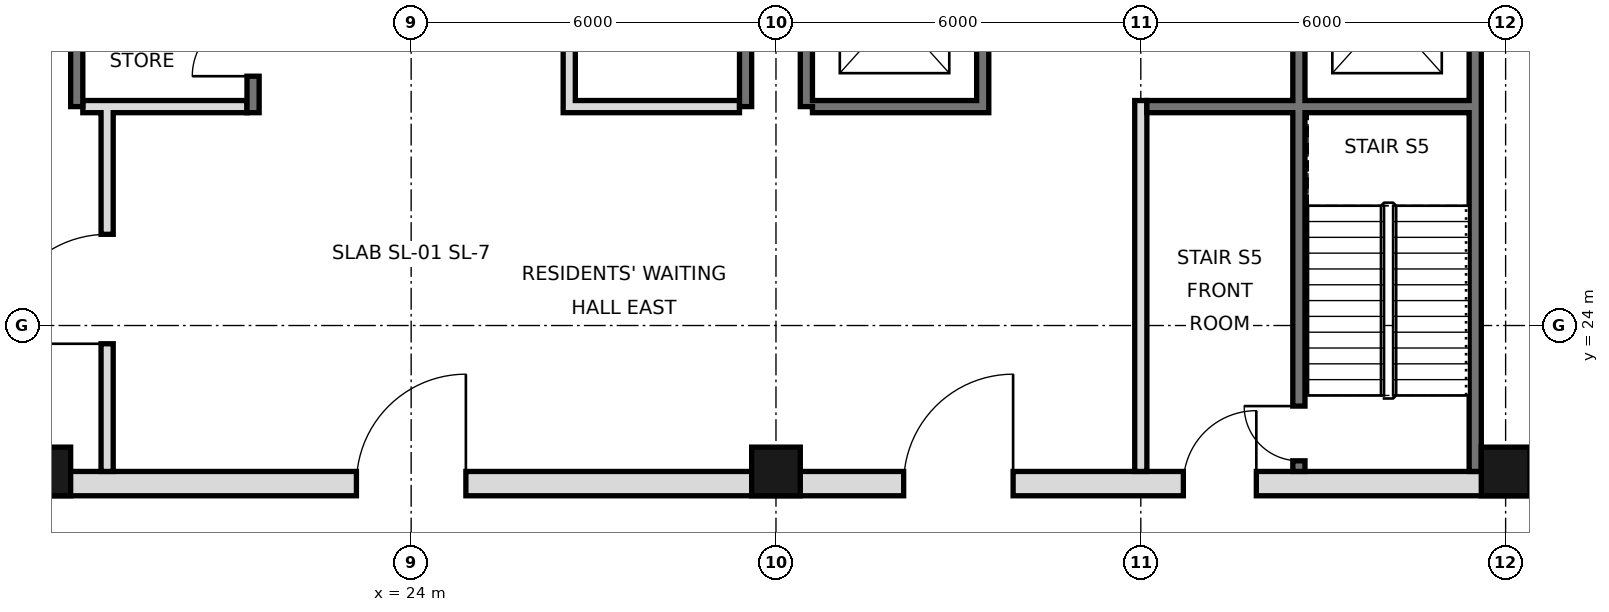
"""IFC4 building model, lengths in metres.
Left out: names, types, materials, properties, quantities, classifications, styles, units other than length and angle.
Written with IfcOpenShell. Run it as: python <this file> out.ifc"""

import sys

from ifc_helpers import new_model, si_unit, direction, frame, frame_2d, origin, origin_2d, place, context, subcontext, project, spatial, rectangle, hollow_rectangle, extrude, element, fill, save


model = new_model("IFC4")
c1 = context("Model", 3, precision=1e-05, world=origin(), true_north=direction((0.0, 1.0)))
c2 = subcontext(c1, "Body", "Model", "MODEL_VIEW")
j1 = project(units=[si_unit("LENGTHUNIT", "METRE"), si_unit("PLANEANGLEUNIT", "RADIAN")], contexts=[c1])
p1 = place(None, origin())
s1 = spatial("IfcSite", under=j1, at=p1, CompositionType="ELEMENT")
p2 = place(p1, origin())
s2 = spatial("IfcBuilding", under=s1, at=p2, CompositionType="ELEMENT")
p3 = place(p2, frame((0.0, 0.0, 277.4)))
s3 = spatial("IfcBuildingStorey", under=s2, at=p3, CompositionType="ELEMENT", Elevation=277.4)
for number, where, z_axis, x_axis in (
    (1, (18.0, 21.6, 0.0), (0.0, 0.0, 1.0), (1.0, 0.0, 0.0)),
    (2, (30.0, 21.6, 0.0), (0.0, 0.0, 1.0), (1.0, 0.0, 0.0)),
    (3, (42.0, 21.6, 0.0), (0.0, 0.0, 1.0), (1.0, 0.0, 0.0)),
):
    element("IfcColumn", number, at=place(p3, frame(where, z_axis=z_axis, x_axis=x_axis)), inside=s3, PredefinedType="COLUMN", context=c2, shape_type="SweptSolid", body=[
        extrude(hollow_rectangle(XDim=0.8, YDim=0.8, WallThickness=0.032, at=origin_2d()), origin(), (0.0, 0.0, 1.0), 4.4),
    ])
p4 = place(p3, frame((41.5, 21.6, 0.0), z_axis=(0.0, 0.0, 1.0), x_axis=(0.0, 1.0, 0.0)))
e4 = element("IfcWall", 4, at=p4, inside=s3, PredefinedType="SOLIDWALL", context=c2, shape_type="SweptSolid", body=[
    extrude(rectangle(XDim=23.5, YDim=0.2, at=frame_2d((11.75, 0.0))), origin(), (0.0, 0.0, 1.0), 4.1),
])
for number, where, z_axis, x_axis in (
    (5, (18.5, 27.6, 0.0), (0.0, 0.0, 1.0), (0.0, 1.0, 0.0)),
    (6, (29.5, 27.6, 0.0), (0.0, 0.0, 1.0), (0.0, 1.0, 0.0)),
    (7, (30.5, 27.6, 0.0), (0.0, 0.0, 1.0), (0.0, 1.0, 0.0)),
):
    element("IfcWall", number, at=place(p3, frame(where, z_axis=z_axis, x_axis=x_axis)), inside=s3, PredefinedType="SOLIDWALL", context=c2, shape_type="SweptSolid", body=[
        extrude(rectangle(XDim=17.5, YDim=0.2, at=frame_2d((8.75, 0.0))), origin(), (0.0, 0.0, 1.0), 4.1),
    ])
p5 = place(p3, frame((5.6, 21.4, 0.0), z_axis=(0.0, 0.0, 1.0), x_axis=(1.0, 0.0, 0.0)))
e8 = element("IfcWall", 8, at=p5, inside=s3, PredefinedType="SOLIDWALL", context=c2, shape_type="SweptSolid", body=[
    extrude(rectangle(XDim=36.8, YDim=0.4, at=frame_2d((18.4, 0.0))), origin(), (0.0, 0.0, 1.0), 4.1),
])
p6 = place(p5, frame((8.5, 0.0, 0.0)))
e9 = element("IfcOpeningElement", 9, at=p6, cuts=e8, PredefinedType="OPENING", context=c2, shape_type="SweptSolid", body=[
    extrude(rectangle(XDim=1.8, YDim=2.1, at=frame_2d((0.9, 1.05))), frame((0.0, 0.21, 0.0), z_axis=(0.0, -1.0, 0.0), x_axis=(1.0, 0.0, 0.0)), (0.0, 0.0, 1.0), 0.42),
])
p7 = place(p5, frame((17.5, 0.0, 0.0)))
e10 = element("IfcOpeningElement", 10, at=p7, cuts=e8, PredefinedType="OPENING", context=c2, shape_type="SweptSolid", body=[
    extrude(rectangle(XDim=1.8, YDim=2.1, at=frame_2d((0.9, 1.05))), frame((0.0, 0.21, 0.0), z_axis=(0.0, -1.0, 0.0), x_axis=(1.0, 0.0, 0.0)), (0.0, 0.0, 1.0), 0.42),
])
p8 = place(p5, frame((26.5, 0.0, 0.0)))
e11 = element("IfcOpeningElement", 11, at=p8, cuts=e8, PredefinedType="OPENING", context=c2, shape_type="SweptSolid", body=[
    extrude(rectangle(XDim=1.8, YDim=2.1, at=frame_2d((0.9, 1.05))), frame((0.0, 0.21, 0.0), z_axis=(0.0, -1.0, 0.0), x_axis=(1.0, 0.0, 0.0)), (0.0, 0.0, 1.0), 0.42),
])
p9 = place(p5, frame((4.5, 0.0, 0.0)))
e12 = element("IfcOpeningElement", 12, at=p9, cuts=e8, PredefinedType="OPENING", context=c2, shape_type="SweptSolid", body=[
    extrude(rectangle(XDim=1.2, YDim=2.1, at=frame_2d((0.6, 1.05))), frame((0.0, 0.21, 0.0), z_axis=(0.0, -1.0, 0.0), x_axis=(1.0, 0.0, 0.0)), (0.0, 0.0, 1.0), 0.42),
])
p10 = place(p5, frame((31.1, 0.0, 0.0)))
e13 = element("IfcOpeningElement", 13, at=p10, cuts=e8, PredefinedType="OPENING", context=c2, shape_type="SweptSolid", body=[
    extrude(rectangle(XDim=1.2, YDim=2.1, at=frame_2d((0.6, 1.05))), frame((0.0, 0.21, 0.0), z_axis=(0.0, -1.0, 0.0), x_axis=(1.0, 0.0, 0.0)), (0.0, 0.0, 1.0), 0.42),
])
p11 = place(p3, frame((19.0, 21.6, 0.0), z_axis=(0.0, 0.0, 1.0), x_axis=(0.0, 1.0, 0.0)))
e14 = element("IfcWall", 14, at=p11, inside=s3, PredefinedType="PARTITIONING", context=c2, shape_type="SweptSolid", body=[
    extrude(rectangle(XDim=6.0, YDim=0.2, at=frame_2d((3.0, 0.0))), origin(), (0.0, 0.0, 1.0), 4.1),
])
p12 = place(p11, frame((2.1, 0.0, 0.0)))
e15 = element("IfcOpeningElement", 15, at=p12, cuts=e14, PredefinedType="OPENING", context=c2, shape_type="SweptSolid", body=[
    extrude(rectangle(XDim=1.8, YDim=2.1, at=frame_2d((0.9, 1.05))), frame((0.0, 0.11, 0.0), z_axis=(0.0, -1.0, 0.0), x_axis=(1.0, 0.0, 0.0)), (0.0, 0.0, 1.0), 0.22),
])
p13 = place(p3, frame((21.4, 27.5, 0.0), z_axis=(0.0, 0.0, 1.0), x_axis=(0.0, 1.0, 0.0)))
e16 = element("IfcWall", 16, at=p13, inside=s3, PredefinedType="SOLIDWALL", context=c2, shape_type="SweptSolid", body=[
    extrude(rectangle(XDim=17.5, YDim=0.2, at=frame_2d((8.75, 0.0))), origin(), (0.0, 0.0, 1.0), 4.1),
])
p14 = place(p13, frame((0.6, 0.0, 0.0)))
e17 = element("IfcOpeningElement", 17, at=p14, cuts=e16, PredefinedType="OPENING", context=c2, shape_type="SweptSolid", body=[
    extrude(rectangle(XDim=1.0, YDim=2.1, at=frame_2d((0.5, 1.05))), frame((0.0, 0.11, 0.0), z_axis=(0.0, -1.0, 0.0), x_axis=(1.0, 0.0, 0.0)), (0.0, 0.0, 1.0), 0.22),
])
p15 = place(p13, frame((3.7, 0.0, 0.0)))
e18 = element("IfcOpeningElement", 18, at=p15, cuts=e16, PredefinedType="OPENING", context=c2, shape_type="SweptSolid", body=[
    extrude(rectangle(XDim=1.0, YDim=2.1, at=frame_2d((0.5, 1.05))), frame((0.0, 0.11, 0.0), z_axis=(0.0, -1.0, 0.0), x_axis=(1.0, 0.0, 0.0)), (0.0, 0.0, 1.0), 0.22),
])
p16 = place(p13, frame((9.8, 0.0, 0.0)))
e19 = element("IfcOpeningElement", 19, at=p16, cuts=e16, PredefinedType="OPENING", context=c2, shape_type="SweptSolid", body=[
    extrude(rectangle(XDim=1.0, YDim=2.1, at=frame_2d((0.5, 1.05))), frame((0.0, 0.11, 0.0), z_axis=(0.0, -1.0, 0.0), x_axis=(1.0, 0.0, 0.0)), (0.0, 0.0, 1.0), 0.22),
])
p17 = place(p13, frame((7.4, 0.0, 0.0)))
e20 = element("IfcOpeningElement", 20, at=p17, cuts=e16, PredefinedType="OPENING", context=c2, shape_type="SweptSolid", body=[
    extrude(rectangle(XDim=0.9, YDim=2.1, at=frame_2d((0.45, 1.05))), frame((0.0, 0.11, 0.0), z_axis=(0.0, -1.0, 0.0), x_axis=(1.0, 0.0, 0.0)), (0.0, 0.0, 1.0), 0.22),
])
p18 = place(p3, frame((26.6, 27.5, 0.0), z_axis=(0.0, 0.0, 1.0), x_axis=(0.0, 1.0, 0.0)))
e21 = element("IfcWall", 21, at=p18, inside=s3, PredefinedType="SOLIDWALL", context=c2, shape_type="SweptSolid", body=[
    extrude(rectangle(XDim=17.5, YDim=0.2, at=frame_2d((8.75, 0.0))), origin(), (0.0, 0.0, 1.0), 4.1),
])
p19 = place(p18, frame((4.3, 0.0, 0.0)))
e22 = element("IfcOpeningElement", 22, at=p19, cuts=e21, PredefinedType="OPENING", context=c2, shape_type="SweptSolid", body=[
    extrude(rectangle(XDim=0.9, YDim=2.1, at=frame_2d((0.45, 1.05))), frame((0.0, 0.11, 0.0), z_axis=(0.0, -1.0, 0.0), x_axis=(1.0, 0.0, 0.0)), (0.0, 0.0, 1.0), 0.22),
])
p20 = place(p18, frame((10.35, 0.0, 0.0)))
e23 = element("IfcOpeningElement", 23, at=p20, cuts=e21, PredefinedType="OPENING", context=c2, shape_type="SweptSolid", body=[
    extrude(rectangle(XDim=1.0, YDim=2.1, at=frame_2d((0.5, 1.05))), frame((0.0, 0.11, 0.0), z_axis=(0.0, -1.0, 0.0), x_axis=(1.0, 0.0, 0.0)), (0.0, 0.0, 1.0), 0.22),
])
p21 = place(p3, frame((33.4, 27.5, 0.0), z_axis=(0.0, 0.0, 1.0), x_axis=(0.0, 1.0, 0.0)))
e24 = element("IfcWall", 24, at=p21, inside=s3, PredefinedType="SOLIDWALL", context=c2, shape_type="SweptSolid", body=[
    extrude(rectangle(XDim=17.5, YDim=0.2, at=frame_2d((8.75, 0.0))), origin(), (0.0, 0.0, 1.0), 4.1),
])
p22 = place(p21, frame((1.1, 0.0, 0.0)))
e25 = element("IfcOpeningElement", 25, at=p22, cuts=e24, PredefinedType="OPENING", context=c2, shape_type="SweptSolid", body=[
    extrude(rectangle(XDim=1.1, YDim=2.1, at=frame_2d((0.55, 1.05))), frame((0.0, 0.11, 0.0), z_axis=(0.0, -1.0, 0.0), x_axis=(1.0, 0.0, 0.0)), (0.0, 0.0, 1.0), 0.22),
])
p23 = place(p21, frame((4.2, 0.0, 0.0)))
e26 = element("IfcOpeningElement", 26, at=p23, cuts=e24, PredefinedType="OPENING", context=c2, shape_type="SweptSolid", body=[
    extrude(rectangle(XDim=1.1, YDim=2.1, at=frame_2d((0.55, 1.05))), frame((0.0, 0.11, 0.0), z_axis=(0.0, -1.0, 0.0), x_axis=(1.0, 0.0, 0.0)), (0.0, 0.0, 1.0), 0.22),
])
p24 = place(p21, frame((15.4, 0.0, 0.0)))
e27 = element("IfcOpeningElement", 27, at=p24, cuts=e24, PredefinedType="OPENING", context=c2, shape_type="SweptSolid", body=[
    extrude(rectangle(XDim=1.1, YDim=2.1, at=frame_2d((0.55, 1.05))), frame((0.0, 0.11, 0.0), z_axis=(0.0, -1.0, 0.0), x_axis=(1.0, 0.0, 0.0)), (0.0, 0.0, 1.0), 0.22),
])
p25 = place(p21, frame((9.9, 0.0, 0.0)))
e28 = element("IfcOpeningElement", 28, at=p25, cuts=e24, PredefinedType="OPENING", context=c2, shape_type="SweptSolid", body=[
    extrude(rectangle(XDim=0.9, YDim=2.1, at=frame_2d((0.45, 1.05))), frame((0.0, 0.11, 0.0), z_axis=(0.0, -1.0, 0.0), x_axis=(1.0, 0.0, 0.0)), (0.0, 0.0, 1.0), 0.22),
])
p26 = place(p3, frame((36.0, 21.6, 0.0), z_axis=(0.0, 0.0, 1.0), x_axis=(0.0, 1.0, 0.0)))
e29 = element("IfcWall", 29, at=p26, inside=s3, PredefinedType="PARTITIONING", context=c2, shape_type="SweptSolid", body=[
    extrude(rectangle(XDim=6.1, YDim=0.2, at=frame_2d((3.05, 0.0))), origin(), (0.0, 0.0, 1.0), 4.1),
])
p27 = place(p3, frame((38.6, 21.6, 0.0), z_axis=(0.0, 0.0, 1.0), x_axis=(0.0, 1.0, 0.0)))
e30 = element("IfcWall", 30, at=p27, inside=s3, PredefinedType="SOLIDWALL", context=c2, shape_type="SweptSolid", body=[
    extrude(rectangle(XDim=23.4, YDim=0.2, at=frame_2d((11.7, 0.0))), origin(), (0.0, 0.0, 1.0), 4.1),
])
p28 = place(p27, frame((7.0, 0.0, 0.0)))
e31 = element("IfcOpeningElement", 31, at=p28, cuts=e30, PredefinedType="OPENING", context=c2, shape_type="SweptSolid", body=[
    extrude(rectangle(XDim=1.1, YDim=2.1, at=frame_2d((0.55, 1.05))), frame((0.0, 0.11, 0.0), z_axis=(0.0, -1.0, 0.0), x_axis=(1.0, 0.0, 0.0)), (0.0, 0.0, 1.0), 0.22),
])
p29 = place(p27, frame((10.1, 0.0, 0.0)))
e32 = element("IfcOpeningElement", 32, at=p29, cuts=e30, PredefinedType="OPENING", context=c2, shape_type="SweptSolid", body=[
    extrude(rectangle(XDim=1.1, YDim=2.1, at=frame_2d((0.55, 1.05))), frame((0.0, 0.11, 0.0), z_axis=(0.0, -1.0, 0.0), x_axis=(1.0, 0.0, 0.0)), (0.0, 0.0, 1.0), 0.22),
])
p30 = place(p27, frame((13.2, 0.0, 0.0)))
e33 = element("IfcOpeningElement", 33, at=p30, cuts=e30, PredefinedType="OPENING", context=c2, shape_type="SweptSolid", body=[
    extrude(rectangle(XDim=1.1, YDim=2.1, at=frame_2d((0.55, 1.05))), frame((0.0, 0.11, 0.0), z_axis=(0.0, -1.0, 0.0), x_axis=(1.0, 0.0, 0.0)), (0.0, 0.0, 1.0), 0.22),
])
p31 = place(p27, frame((15.7, 0.0, 0.0)))
e34 = element("IfcOpeningElement", 34, at=p31, cuts=e30, PredefinedType="OPENING", context=c2, shape_type="SweptSolid", body=[
    extrude(rectangle(XDim=1.0, YDim=2.1, at=frame_2d((0.5, 1.05))), frame((0.0, 0.11, 0.0), z_axis=(0.0, -1.0, 0.0), x_axis=(1.0, 0.0, 0.0)), (0.0, 0.0, 1.0), 0.22),
])
p32 = place(p27, frame((0.175, 0.0, 0.0)))
e35 = element("IfcOpeningElement", 35, at=p32, cuts=e30, PredefinedType="OPENING", context=c2, shape_type="SweptSolid", body=[
    extrude(rectangle(XDim=0.9, YDim=2.1, at=frame_2d((0.45, 1.05))), frame((0.0, 0.11, 0.0), z_axis=(0.0, -1.0, 0.0), x_axis=(1.0, 0.0, 0.0)), (0.0, 0.0, 1.0), 0.22),
])
p33 = place(p3, frame((18.6, 27.6, 0.0), z_axis=(0.0, 0.0, 1.0), x_axis=(1.0, 0.0, 0.0)))
e36 = element("IfcWall", 36, at=p33, inside=s3, PredefinedType="PARTITIONING", context=c2, shape_type="SweptSolid", body=[
    extrude(rectangle(XDim=2.7, YDim=0.2, at=frame_2d((1.35, 0.0))), origin(), (0.0, 0.0, 1.0), 4.1),
])
for number, where, z_axis, x_axis in (
    (37, (26.7, 27.6, 0.0), (0.0, 0.0, 1.0), (1.0, 0.0, 0.0)),
    (38, (30.6, 27.6, 0.0), (0.0, 0.0, 1.0), (1.0, 0.0, 0.0)),
):
    element("IfcWall", number, at=place(p3, frame(where, z_axis=z_axis, x_axis=x_axis)), inside=s3, PredefinedType="SOLIDWALL", context=c2, shape_type="SweptSolid", body=[
        extrude(rectangle(XDim=2.7, YDim=0.2, at=frame_2d((1.35, 0.0))), origin(), (0.0, 0.0, 1.0), 4.1),
    ])
p34 = place(p3, frame((36.1, 27.6, 0.0), z_axis=(0.0, 0.0, 1.0), x_axis=(1.0, 0.0, 0.0)))
e39 = element("IfcWall", 39, at=p34, inside=s3, PredefinedType="SOLIDWALL", context=c2, shape_type="SweptSolid", body=[
    extrude(rectangle(XDim=5.3, YDim=0.2, at=frame_2d((2.65, 0.0))), origin(), (0.0, 0.0, 1.0), 4.1),
])
p35 = place(p12, origin())
e40 = element("IfcDoor", 40, at=p35, inside=s3, OperationType="SINGLE_SWING_LEFT", PredefinedType="DOOR", context=c2, shape_type="SweptSolid", body=[
    extrude(rectangle(XDim=1.8, YDim=2.1, at=frame_2d((0.9, 1.05))), frame((0.0, 0.025, 0.0), z_axis=(0.0, -1.0, 0.0), x_axis=(1.0, 0.0, 0.0)), (0.0, 0.0, 1.0), 0.05),
])
fill(e15, e40)
p36 = place(p7, frame((1.8, 0.0, 0.0), z_axis=(0.0, 0.0, 1.0), x_axis=(-1.0, 0.0, 0.0)))
e41 = element("IfcDoor", 41, at=p36, inside=s3, OperationType="SINGLE_SWING_LEFT", PredefinedType="DOOR", context=c2, shape_type="SweptSolid", body=[
    extrude(rectangle(XDim=1.8, YDim=2.1, at=frame_2d((0.9, 1.05))), frame((0.0, 0.025, 0.0), z_axis=(0.0, -1.0, 0.0), x_axis=(1.0, 0.0, 0.0)), (0.0, 0.0, 1.0), 0.05),
])
fill(e10, e41)
p37 = place(p8, frame((1.8, 0.0, 0.0), z_axis=(0.0, 0.0, 1.0), x_axis=(-1.0, 0.0, 0.0)))
e42 = element("IfcDoor", 42, at=p37, inside=s3, OperationType="SINGLE_SWING_LEFT", PredefinedType="DOOR", context=c2, shape_type="SweptSolid", body=[
    extrude(rectangle(XDim=1.8, YDim=2.1, at=frame_2d((0.9, 1.05))), frame((0.0, 0.025, 0.0), z_axis=(0.0, -1.0, 0.0), x_axis=(1.0, 0.0, 0.0)), (0.0, 0.0, 1.0), 0.05),
])
fill(e11, e42)
p38 = place(p10, frame((1.2, 0.0, 0.0), z_axis=(0.0, 0.0, 1.0), x_axis=(-1.0, 0.0, 0.0)))
e43 = element("IfcDoor", 43, at=p38, inside=s3, OperationType="SINGLE_SWING_LEFT", PredefinedType="DOOR", context=c2, shape_type="SweptSolid", body=[
    extrude(rectangle(XDim=1.2, YDim=2.1, at=frame_2d((0.6, 1.05))), frame((0.0, 0.025, 0.0), z_axis=(0.0, -1.0, 0.0), x_axis=(1.0, 0.0, 0.0)), (0.0, 0.0, 1.0), 0.05),
])
fill(e13, e43)
p39 = place(p14, origin())
e44 = element("IfcDoor", 44, at=p39, inside=s3, OperationType="SINGLE_SWING_LEFT", PredefinedType="DOOR", context=c2, shape_type="SweptSolid", body=[
    extrude(rectangle(XDim=1.0, YDim=2.1, at=frame_2d((0.5, 1.05))), frame((0.0, 0.025, 0.0), z_axis=(0.0, -1.0, 0.0), x_axis=(1.0, 0.0, 0.0)), (0.0, 0.0, 1.0), 0.05),
])
fill(e17, e44)
p40 = place(p32, frame((0.9, 0.0, 0.0), z_axis=(0.0, 0.0, 1.0), x_axis=(-1.0, 0.0, 0.0)))
e45 = element("IfcDoor", 45, at=p40, inside=s3, OperationType="SINGLE_SWING_LEFT", PredefinedType="DOOR", context=c2, shape_type="SweptSolid", body=[
    extrude(rectangle(XDim=0.9, YDim=2.1, at=frame_2d((0.45, 1.05))), frame((0.0, 0.025, 0.0), z_axis=(0.0, -1.0, 0.0), x_axis=(1.0, 0.0, 0.0)), (0.0, 0.0, 1.0), 0.05),
])
fill(e35, e45)
save(model, sys.argv[1])
